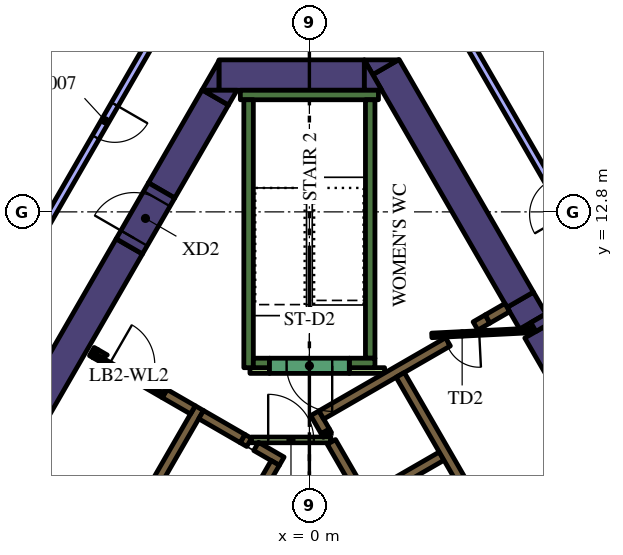
"""IFC4 building model, lengths in metres.
Left out: names, types, materials, properties, quantities, classifications, styles, units other than length and angle.
Written with IfcOpenShell. Run it as: python <this file> out.ifc"""

import sys

from ifc_helpers import new_model, si_unit, direction, frame, frame_2d, origin, place, context, subcontext, project, spatial, polyline, rectangle, outline, extrude, element, fill, save


model = new_model("IFC4")
c1 = context("Model", 3, precision=1e-05, world=origin(), true_north=direction((0.0, 1.0)))
c2 = subcontext(c1, "Body", "Model", "MODEL_VIEW")
j1 = project(units=[si_unit("LENGTHUNIT", "METRE"), si_unit("PLANEANGLEUNIT", "RADIAN")], contexts=[c1])
p1 = place(None, origin())
s1 = spatial("IfcSite", under=j1, at=p1, CompositionType="ELEMENT")
p2 = place(p1, origin())
s2 = spatial("IfcBuilding", under=s1, at=p2, CompositionType="ELEMENT")
p3 = place(p2, frame((0.0, 0.0, 183.6)))
s3 = spatial("IfcBuildingStorey", under=s2, at=p3, CompositionType="ELEMENT", Elevation=183.6)
p4 = place(p3, frame((5.878, 9.918, 0.0), z_axis=(0.0, 0.0, 1.0), x_axis=(-0.499893918903, 0.866086641072, 0.0)))
e1 = element("IfcWall", 1, at=p4, inside=s3, PredefinedType="SOLIDWALL", context=c2, shape_type="SweptSolid", body=[
    extrude(rectangle(XDim=0.657, YDim=0.8, at=frame_2d((0.329, 0.0))), origin(), (0.0, 0.0, 1.0), 4.2),
])
p5 = place(p3, frame((8.279, 5.761, 0.0), z_axis=(0.0, 0.0, 1.0), x_axis=(-0.500024261398, 0.866011396007, 0.0)))
e2 = element("IfcWall", 2, at=p5, inside=s3, PredefinedType="SOLIDWALL", context=c2, shape_type="SweptSolid", body=[
    extrude(rectangle(XDim=4.528, YDim=0.8, at=frame_2d((2.264, 0.0))), origin(), (0.0, 0.0, 1.0), 4.2),
])
p6 = place(p3, origin())
e3 = element("IfcWall", 3, at=p6, inside=s3, PredefinedType="SOLIDWALL", context=c2, shape_type="SweptSolid", body=[
    extrude(outline(polyline([(5.961, 9.654), (5.827, 9.886), (6.226, 10.116), (6.36, 9.884), (5.961, 9.654)])), origin(), (0.0, 0.0, 1.0), 4.2),
])
p7 = place(p3, frame((5.549, 10.489, 0.0), z_axis=(0.0, 0.0, 1.0), x_axis=(-0.50001746176, 0.866015321998, 0.0)))
e4 = element("IfcWall", 4, at=p7, inside=s3, PredefinedType="SOLIDWALL", context=c2, shape_type="SweptSolid", body=[
    extrude(rectangle(XDim=7.068, YDim=0.8, at=frame_2d((3.534, 0.0))), origin(), (0.0, 0.0, 1.0), 4.2),
])
e5 = element("IfcWall", 5, at=p6, inside=s3, PredefinedType="SOLIDWALL", context=c2, shape_type="SweptSolid", body=[
    extrude(outline(polyline([(1.443, 16.8), (2.339, 16.8), (1.667, 16.412), (1.443, 16.8)])), origin(), (0.0, 0.0, 1.0), 4.2),
])
p8 = place(p3, frame((-2.379, 16.4, 0.0), z_axis=(0.0, 0.0, 1.0), x_axis=(1.0, 0.0, 0.0)))
e6 = element("IfcWall", 6, at=p8, inside=s3, PredefinedType="SOLIDWALL", context=c2, shape_type="SweptSolid", body=[
    extrude(rectangle(XDim=3.824, YDim=0.8, at=frame_2d((1.912, 0.0))), origin(), (0.0, 0.0, 1.0), 4.2),
])
e7 = element("IfcWall", 7, at=p6, inside=s3, PredefinedType="SOLIDWALL", context=c2, shape_type="SweptSolid", body=[
    extrude(outline(polyline([(1.905, 16.0), (1.447, 16.0), (1.447, 16.793), (1.905, 16.0)])), origin(), (0.0, 0.0, 1.0), 4.2),
])
e8 = element("IfcWall", 8, at=p6, inside=s3, PredefinedType="SOLIDWALL", context=c2, shape_type="SweptSolid", body=[
    extrude(outline(polyline([(-2.829, 16.0), (-2.381, 16.776), (-2.381, 16.0), (-2.829, 16.0)])), origin(), (0.0, 0.0, 1.0), 4.2),
])
p9 = place(p3, frame((-2.477, 15.81, 0.0), z_axis=(0.0, 0.0, 1.0), x_axis=(-0.499969377405, -0.866043083026, 0.0)))
e9 = element("IfcWall", 9, at=p9, inside=s3, PredefinedType="SOLIDWALL", context=c2, shape_type="SweptSolid", body=[
    extrude(rectangle(XDim=2.824, YDim=0.8, at=frame_2d((1.412, 0.0))), origin(), (0.0, 0.0, 1.0), 4.2),
])
e10 = element("IfcWall", 10, at=p6, inside=s3, PredefinedType="SOLIDWALL", context=c2, shape_type="SweptSolid", body=[
    extrude(outline(polyline([(-1.905, 16.0), (-2.129, 15.612), (-2.801, 16.0), (-1.905, 16.0)])), origin(), (0.0, 0.0, 1.0), 4.2),
])
p10 = place(p3, frame((-12.668, -1.842, 0.0), z_axis=(0.0, 0.0, 1.0), x_axis=(0.500003640647, 0.866023301845, 0.0)))
e11 = element("IfcWall", 11, at=p10, inside=s3, PredefinedType="SOLIDWALL", context=c2, shape_type="SweptSolid", body=[
    extrude(rectangle(XDim=15.858, YDim=0.8, at=frame_2d((7.929, 0.0))), origin(), (0.0, 0.0, 1.0), 4.2),
])
p11 = place(p3, frame((-1.817, 15.875, 0.0), z_axis=(0.0, 0.0, 1.0), x_axis=(1.0, 0.0, 0.0)))
e12 = element("IfcWall", 12, at=p11, inside=s3, PredefinedType="SOLIDWALL", context=c2, shape_type="SweptSolid", body=[
    extrude(rectangle(XDim=3.634, YDim=0.25, at=frame_2d((1.817, 0.0))), origin(), (0.0, 0.0, 1.0), 4.2),
])
p12 = place(p3, frame((1.6, 8.95, 0.0), z_axis=(0.0, 0.0, 1.0), x_axis=(0.0, 1.0, 0.0)))
e13 = element("IfcWall", 13, at=p12, inside=s3, PredefinedType="SOLIDWALL", context=c2, shape_type="SweptSolid", body=[
    extrude(rectangle(XDim=6.8, YDim=0.25, at=frame_2d((3.4, 0.0))), origin(), (0.0, 0.0, 1.0), 4.2),
])
p13 = place(p3, frame((1.05, 8.825, 0.0), z_axis=(0.0, 0.0, 1.0), x_axis=(1.0, 0.0, 0.0)))
e14 = element("IfcWall", 14, at=p13, inside=s3, PredefinedType="SOLIDWALL", context=c2, shape_type="SweptSolid", body=[
    extrude(rectangle(XDim=0.675, YDim=0.25, at=frame_2d((0.337, 0.0))), origin(), (0.0, 0.0, 1.0), 4.2),
])
p14 = place(p3, frame((-1.6, 8.7, 0.0), z_axis=(0.0, 0.0, 1.0), x_axis=(0.0, 1.0, 0.0)))
e15 = element("IfcWall", 15, at=p14, inside=s3, PredefinedType="SOLIDWALL", context=c2, shape_type="SweptSolid", body=[
    extrude(rectangle(XDim=7.05, YDim=0.25, at=frame_2d((3.525, 0.0))), origin(), (0.0, 0.0, 1.0), 4.2),
])
p15 = place(p3, frame((-1.475, 8.825, 0.0), z_axis=(0.0, 0.0, 1.0), x_axis=(1.0, 0.0, 0.0)))
e16 = element("IfcWall", 16, at=p15, inside=s3, PredefinedType="SOLIDWALL", context=c2, shape_type="SweptSolid", body=[
    extrude(rectangle(XDim=0.425, YDim=0.25, at=frame_2d((0.212, 0.0))), origin(), (0.0, 0.0, 1.0), 4.2),
])
p16 = place(p3, frame((0.473, 6.93, 0.0), z_axis=(0.0, 0.0, 1.0), x_axis=(-0.49972245349, 0.866185586049, 0.0)))
e17 = element("IfcWall", 17, at=p16, inside=s3, PredefinedType="SOLIDWALL", context=c2, shape_type="SweptSolid", body=[
    extrude(rectangle(XDim=0.11, YDim=0.25, at=frame_2d((0.055, 0.0))), origin(), (0.0, 0.0, 1.0), 4.2),
])
p17 = place(p3, frame((6.568, -3.627, 0.0), z_axis=(0.0, 0.0, 1.0), x_axis=(-0.499999455981, 0.866025717874, 0.0)))
e18 = element("IfcWall", 18, at=p17, inside=s3, PredefinedType="SOLIDWALL", context=c2, shape_type="SweptSolid", body=[
    extrude(rectangle(XDim=11.978, YDim=0.25, at=frame_2d((5.989, 0.0))), origin(), (0.0, 0.0, 1.0), 4.2),
])
p18 = place(p3, frame((0.417, 7.027, 0.0), z_axis=(0.0, 0.0, 1.0), x_axis=(-0.500210807569, 0.865903659763, 0.0)))
e19 = element("IfcWall", 19, at=p18, inside=s3, PredefinedType="SOLIDWALL", context=c2, shape_type="SweptSolid", body=[
    extrude(rectangle(XDim=0.548, YDim=0.25, at=frame_2d((0.274, 0.0))), origin(), (0.0, 0.0, 1.0), 4.2),
])
p19 = place(p3, frame((3.647, 9.38, 0.0), z_axis=(0.0, 0.0, 1.0), x_axis=(-0.866025015791, -0.500000672024, 0.0)))
e20 = element("IfcWall", 20, at=p19, inside=s3, PredefinedType="SOLIDWALL", context=c2, shape_type="SweptSolid", body=[
    extrude(rectangle(XDim=3.849, YDim=0.25, at=frame_2d((1.924, 0.0))), origin(), (0.0, 0.0, 1.0), 4.2),
])
p20 = place(p3, frame((1.574, 5.274, 0.0), z_axis=(0.0, 0.0, 1.0), x_axis=(0.866028486751, 0.499994660107, 0.0)))
e21 = element("IfcWall", 21, at=p20, inside=s3, PredefinedType="SOLIDWALL", context=c2, shape_type="SweptSolid", body=[
    extrude(rectangle(XDim=2.2, YDim=0.25, at=frame_2d((1.1, 0.0))), origin(), (0.0, 0.0, 1.0), 4.2),
])
p21 = place(p3, frame((4.688, 9.981, 0.0), z_axis=(0.0, 0.0, 1.0), x_axis=(-0.865974312977, -0.500088481434, 0.0)))
e22 = element("IfcWall", 22, at=p21, inside=s3, PredefinedType="SOLIDWALL", context=c2, shape_type="SweptSolid", body=[
    extrude(rectangle(XDim=0.366, YDim=0.25, at=frame_2d((0.183, 0.0))), origin(), (0.0, 0.0, 1.0), 4.2),
])
p22 = place(p3, frame((4.689, 9.982, 0.0), z_axis=(0.0, 0.0, 1.0), x_axis=(0.865947592822, 0.500134748329, 0.0)))
e23 = element("IfcWall", 23, at=p22, inside=s3, PredefinedType="SOLIDWALL", context=c2, shape_type="SweptSolid", body=[
    extrude(rectangle(XDim=0.598, YDim=0.25, at=frame_2d((0.299, 0.0))), origin(), (0.0, 0.0, 1.0), 4.2),
])
p23 = place(p3, frame((-8.06, -1.311, 0.0), z_axis=(0.0, 0.0, 1.0), x_axis=(0.50000273126, 0.866023826885, 0.0)))
e24 = element("IfcWall", 24, at=p23, inside=s3, PredefinedType="SOLIDWALL", context=c2, shape_type="SweptSolid", body=[
    extrude(rectangle(XDim=10.33, YDim=0.25, at=frame_2d((5.165, 0.0))), origin(), (0.0, 0.0, 1.0), 4.2),
])
p24 = place(p3, frame((-1.758, 6.835, 0.0), z_axis=(0.0, 0.0, 1.0), x_axis=(0.865982457891, -0.500074377092, 0.0)))
e25 = element("IfcWall", 25, at=p24, inside=s3, PredefinedType="SOLIDWALL", context=c2, shape_type="SweptSolid", body=[
    extrude(rectangle(XDim=0.2, YDim=0.25, at=frame_2d((0.1, 0.0))), origin(), (0.0, 0.0, 1.0), 4.2),
])
p25 = place(p3, frame((-1.76, 6.836, 0.0), z_axis=(0.0, 0.0, 1.0), x_axis=(-0.865952863304, 0.500125622755, 0.0)))
e26 = element("IfcWall", 26, at=p25, inside=s3, PredefinedType="SOLIDWALL", context=c2, shape_type="SweptSolid", body=[
    extrude(rectangle(XDim=1.258, YDim=0.25, at=frame_2d((0.629, 0.0))), origin(), (0.0, 0.0, 1.0), 4.2),
])
p26 = place(p3, frame((-0.728, 6.24, 0.0), z_axis=(0.0, 0.0, 1.0), x_axis=(-0.865955664968, 0.500120771724, 0.0)))
e27 = element("IfcWall", 27, at=p26, inside=s3, PredefinedType="SOLIDWALL", context=c2, shape_type="SweptSolid", body=[
    extrude(rectangle(XDim=0.778, YDim=0.25, at=frame_2d((0.389, 0.0))), origin(), (0.0, 0.0, 1.0), 4.2),
])
p27 = place(p3, frame((-5.725, 9.125, 0.0), z_axis=(0.0, 0.0, 1.0), x_axis=(0.866185586049, -0.49972245349, 0.0)))
e28 = element("IfcWall", 28, at=p27, inside=s3, PredefinedType="SOLIDWALL", context=c2, shape_type="SweptSolid", body=[
    extrude(rectangle(XDim=0.11, YDim=0.25, at=frame_2d((0.055, 0.0))), origin(), (0.0, 0.0, 1.0), 4.2),
])
p28 = place(p3, frame((-3.066, 7.59, 0.0), z_axis=(0.0, 0.0, 1.0), x_axis=(-0.866081358704, 0.49990307071, 0.0)))
e29 = element("IfcWall", 29, at=p28, inside=s3, PredefinedType="SOLIDWALL", context=c2, shape_type="SweptSolid", body=[
    extrude(rectangle(XDim=0.858, YDim=0.25, at=frame_2d((0.429, 0.0))), origin(), (0.0, 0.0, 1.0), 4.2),
])
e30 = element("IfcWall", 30, at=p6, inside=s3, PredefinedType="SOLIDWALL", context=c2, shape_type="SweptSolid", body=[
    extrude(outline(polyline([(-3.748, 8.128), (-3.813, 8.015), (-4.027, 8.139), (-4.017, 8.156), (-4.008, 8.173), (-4.0, 8.192), (-3.995, 8.21), (-3.991, 8.23), (-3.99, 8.25), (-3.99, 8.268), (-3.748, 8.128)])), origin(), (0.0, 0.0, 1.0), 4.2),
])
e31 = element("IfcWall", 31, at=p6, inside=s3, PredefinedType="SOLIDWALL", context=c2, shape_type="SweptSolid", body=[
    extrude(outline(polyline([(-5.689, 8.96), (-5.69, 8.961), (-5.565, 9.177), (-5.319, 9.035), (-5.335, 9.026), (-5.351, 9.015), (-5.366, 9.002), (-5.379, 8.988), (-5.392, 8.972), (-5.402, 8.956), (-5.412, 8.939), (-5.629, 9.064), (-5.629, 9.064), (-5.689, 8.96)])), origin(), (0.0, 0.0, 1.0), 4.2),
])
p29 = place(p3, frame((1.05, 8.625, 0.0), z_axis=(0.0, 0.0, 1.0), x_axis=(1.0, 0.0, 0.0)))
e32 = element("IfcWall", 32, at=p29, inside=s3, PredefinedType="PARTITIONING", context=c2, shape_type="SweptSolid", body=[
    extrude(rectangle(XDim=0.929, YDim=0.15, at=frame_2d((0.464, 0.0))), origin(), (0.0, 0.0, 1.0), 3.15),
])
p30 = place(p3, frame((-1.564, 8.625, 0.0), z_axis=(0.0, 0.0, 1.0), x_axis=(1.0, 0.0, 0.0)))
e33 = element("IfcWall", 33, at=p30, inside=s3, PredefinedType="PARTITIONING", context=c2, shape_type="SweptSolid", body=[
    extrude(rectangle(XDim=0.514, YDim=0.15, at=frame_2d((0.257, 0.0))), origin(), (0.0, 0.0, 1.0), 3.15),
])
p31 = place(p3, frame((8.565, -2.185, 0.0), z_axis=(0.0, 0.0, 1.0), x_axis=(-0.499997954832, 0.866026584559, 0.0)))
e34 = element("IfcWall", 34, at=p31, inside=s3, PredefinedType="SOLIDWALL", context=c2, shape_type="SweptSolid", body=[
    extrude(rectangle(XDim=12.35, YDim=0.25, at=frame_2d((6.175, 0.0))), origin(), (0.0, 0.0, 1.0), 4.2),
])
p32 = place(p31, frame((0.585, 0.0, 0.0)))
e35 = element("IfcOpeningElement", 35, at=p32, cuts=e34, PredefinedType="OPENING", context=c2, shape_type="SweptSolid", body=[
    extrude(rectangle(XDim=1.1, YDim=2.1, at=frame_2d((0.55, 1.05))), frame((0.0, 0.135, 0.0), z_axis=(0.0, -1.0, 0.0), x_axis=(1.0, 0.0, 0.0)), (0.0, 0.0, 1.0), 0.27),
])
p33 = place(p3, frame((-0.898, 6.194, 0.0), z_axis=(0.0, 0.0, 1.0), x_axis=(-0.499996202215, -0.866027596426, 0.0)))
e36 = element("IfcWall", 36, at=p33, inside=s3, PredefinedType="SOLIDWALL", context=c2, shape_type="SweptSolid", body=[
    extrude(rectangle(XDim=9.83, YDim=0.25, at=frame_2d((4.915, 0.0))), origin(), (0.0, 0.0, 1.0), 4.2),
])
p34 = place(p33, frame((0.585, 0.0, 0.0)))
e37 = element("IfcOpeningElement", 37, at=p34, cuts=e36, PredefinedType="OPENING", context=c2, shape_type="SweptSolid", body=[
    extrude(rectangle(XDim=1.1, YDim=2.1, at=frame_2d((0.55, 1.05))), frame((0.0, 0.135, 0.0), z_axis=(0.0, -1.0, 0.0), x_axis=(1.0, 0.0, 0.0)), (0.0, 0.0, 1.0), 0.27),
])
p35 = place(p33, frame((3.105, 0.0, 0.0)))
e38 = element("IfcOpeningElement", 38, at=p35, cuts=e36, PredefinedType="OPENING", context=c2, shape_type="SweptSolid", body=[
    extrude(rectangle(XDim=1.1, YDim=2.1, at=frame_2d((0.55, 1.05))), frame((0.0, 0.135, 0.0), z_axis=(0.0, -1.0, 0.0), x_axis=(1.0, 0.0, 0.0)), (0.0, 0.0, 1.0), 0.27),
])
p36 = place(p33, frame((5.625, 0.0, 0.0)))
e39 = element("IfcOpeningElement", 39, at=p36, cuts=e36, PredefinedType="OPENING", context=c2, shape_type="SweptSolid", body=[
    extrude(rectangle(XDim=1.1, YDim=2.1, at=frame_2d((0.55, 1.05))), frame((0.0, 0.135, 0.0), z_axis=(0.0, -1.0, 0.0), x_axis=(1.0, 0.0, 0.0)), (0.0, 0.0, 1.0), 0.27),
])
p37 = place(p33, frame((8.145, 0.0, 0.0)))
e40 = element("IfcOpeningElement", 40, at=p37, cuts=e36, PredefinedType="OPENING", context=c2, shape_type="SweptSolid", body=[
    extrude(rectangle(XDim=1.1, YDim=2.1, at=frame_2d((0.55, 1.05))), frame((0.0, 0.135, 0.0), z_axis=(0.0, -1.0, 0.0), x_axis=(1.0, 0.0, 0.0)), (0.0, 0.0, 1.0), 0.27),
])
p38 = place(p3, frame((1.05, 8.75, 0.0), z_axis=(0.0, 0.0, 1.0), x_axis=(-1.0, 0.0, 0.0)))
e41 = element("IfcWall", 41, at=p38, inside=s3, PredefinedType="SOLIDWALL", context=c2, shape_type="SweptSolid", body=[
    extrude(rectangle(XDim=2.1, YDim=0.4, at=frame_2d((1.05, 0.0))), origin(), (0.0, 0.0, 1.0), 4.2),
])
p39 = place(p38, frame((0.45, 0.0, 0.0)))
e42 = element("IfcOpeningElement", 42, at=p39, cuts=e41, PredefinedType="OPENING", context=c2, shape_type="SweptSolid", body=[
    extrude(rectangle(XDim=1.2, YDim=2.1, at=frame_2d((0.6, 1.05))), frame((0.0, 0.21, 0.0), z_axis=(0.0, -1.0, 0.0), x_axis=(1.0, 0.0, 0.0)), (0.0, 0.0, 1.0), 0.42),
])
p40 = place(p3, frame((5.917, 9.684, 0.0), z_axis=(0.0, 0.0, 1.0), x_axis=(-0.998758194515, -0.049820366212, 0.0)))
e43 = element("IfcWall", 43, at=p40, inside=s3, PredefinedType="PARTITIONING", context=c2, shape_type="SweptSolid", body=[
    extrude(rectangle(XDim=2.7, YDim=0.12, at=frame_2d((1.35, 0.0))), origin(), (0.0, 0.0, 1.0), 3.15),
])
p41 = place(p40, frame((1.45, 0.0, 0.0)))
e44 = element("IfcOpeningElement", 44, at=p41, cuts=e43, PredefinedType="OPENING", context=c2, shape_type="SweptSolid", body=[
    extrude(rectangle(XDim=0.9, YDim=2.1, at=frame_2d((0.45, 1.05))), frame((0.0, 0.07, 0.0), z_axis=(0.0, -1.0, 0.0), x_axis=(1.0, 0.0, 0.0)), (0.0, 0.0, 1.0), 0.14),
])
p42 = place(p3, frame((-1.534, 6.8, 0.0), z_axis=(0.0, 0.0, 1.0), x_axis=(1.0, 0.0, 0.0)))
e45 = element("IfcWall", 45, at=p42, inside=s3, PredefinedType="PARTITIONING", context=c2, shape_type="SweptSolid", body=[
    extrude(rectangle(XDim=2.1, YDim=0.15, at=frame_2d((1.05, 0.0))), origin(), (0.0, 0.0, 1.0), 3.15),
])
p43 = place(p42, frame((0.45, 0.0, 0.0)))
e46 = element("IfcOpeningElement", 46, at=p43, cuts=e45, PredefinedType="OPENING", context=c2, shape_type="SweptSolid", body=[
    extrude(rectangle(XDim=1.2, YDim=2.1, at=frame_2d((0.6, 1.05))), frame((0.0, 0.085, 0.0), z_axis=(0.0, -1.0, 0.0), x_axis=(1.0, 0.0, 0.0)), (0.0, 0.0, 1.0), 0.17),
])
p44 = place(p3, frame((-5.659, 9.012, 0.0), z_axis=(0.0, 0.0, 1.0), x_axis=(0.866009402589, -0.500027713859, 0.0)))
e47 = element("IfcWall", 47, at=p44, inside=s3, PredefinedType="PARTITIONING", context=c2, shape_type="SweptSolid", body=[
    extrude(rectangle(XDim=2.1, YDim=0.12, at=frame_2d((1.05, 0.0))), origin(), (0.0, 0.0, 1.0), 3.15),
])
p45 = place(p44, frame((0.45, 0.0, 0.0)))
e48 = element("IfcOpeningElement", 48, at=p45, cuts=e47, PredefinedType="OPENING", context=c2, shape_type="SweptSolid", body=[
    extrude(rectangle(XDim=1.2, YDim=2.1, at=frame_2d((0.6, 1.05))), frame((0.0, 0.07, 0.0), z_axis=(0.0, -1.0, 0.0), x_axis=(1.0, 0.0, 0.0)), (0.0, 0.0, 1.0), 0.14),
])
p46 = place(p3, frame((-4.739, 11.892, 0.0), z_axis=(0.0, 0.0, 1.0), x_axis=(0.500062241894, 0.865989465428, 0.0)))
e49 = element("IfcWall", 49, at=p46, inside=s3, PredefinedType="SOLIDWALL", context=c2, shape_type="SweptSolid", body=[
    extrude(rectangle(XDim=1.7, YDim=0.8, at=frame_2d((0.85, 0.0))), origin(), (0.0, 0.0, 1.0), 4.2),
])
p47 = place(p46, frame((0.25, 0.0, 0.0)))
e50 = element("IfcOpeningElement", 50, at=p47, cuts=e49, PredefinedType="OPENING", context=c2, shape_type="SweptSolid", body=[
    extrude(rectangle(XDim=1.2, YDim=2.1, at=frame_2d((0.6, 1.05))), frame((0.0, 0.41, 0.0), z_axis=(0.0, -1.0, 0.0), x_axis=(1.0, 0.0, 0.0)), (0.0, 0.0, 1.0), 0.82),
])
p48 = place(p3, frame((8.844, 9.182, 0.0), z_axis=(0.0, 0.0, 1.0), x_axis=(-0.50000000053, 0.866025403479, 0.0)))
e51 = element("IfcWall", 51, at=p48, inside=s3, PredefinedType="PARTITIONING", context=c2, shape_type="SweptSolid", body=[
    extrude(rectangle(XDim=9.188, YDim=0.2, at=frame_2d((4.594, 0.0))), origin(), (0.0, 0.0, 1.0), 3.15),
])
p49 = place(p48, frame((4.1, 0.0, 0.0)))
e52 = element("IfcOpeningElement", 52, at=p49, cuts=e51, PredefinedType="OPENING", context=c2, shape_type="SweptSolid", body=[
    extrude(rectangle(XDim=1.0, YDim=2.1, at=frame_2d((0.5, 1.05))), frame((0.0, 0.11, 0.0), z_axis=(0.0, -1.0, 0.0), x_axis=(1.0, 0.0, 0.0)), (0.0, 0.0, 1.0), 0.22),
])
p50 = place(p3, frame((-3.421, 18.574, 0.0), z_axis=(0.0, 0.0, 1.0), x_axis=(-0.499989434416, -0.866031503741, 0.0)))
e53 = element("IfcWall", 53, at=p50, inside=s3, PredefinedType="PARTITIONING", context=c2, shape_type="SweptSolid", body=[
    extrude(rectangle(XDim=7.863, YDim=0.2, at=frame_2d((3.932, 0.0))), origin(), (0.0, 0.0, 1.0), 3.15),
])
p51 = place(p50, frame((3.4, 0.0, 0.0)))
e54 = element("IfcOpeningElement", 54, at=p51, cuts=e53, PredefinedType="OPENING", context=c2, shape_type="SweptSolid", body=[
    extrude(rectangle(XDim=1.0, YDim=2.1, at=frame_2d((0.5, 1.05))), frame((0.0, 0.11, 0.0), z_axis=(0.0, -1.0, 0.0), x_axis=(1.0, 0.0, 0.0)), (0.0, 0.0, 1.0), 0.22),
])
p52 = place(p39, origin())
e55 = element("IfcDoor", 55, at=p52, inside=s3, OperationType="SINGLE_SWING_LEFT", PredefinedType="DOOR", context=c2, shape_type="SweptSolid", body=[
    extrude(rectangle(XDim=1.2, YDim=2.1, at=frame_2d((0.6, 1.05))), frame((0.0, 0.025, 0.0), z_axis=(0.0, -1.0, 0.0), x_axis=(1.0, 0.0, 0.0)), (0.0, 0.0, 1.0), 0.05),
])
fill(e42, e55)
p53 = place(p41, origin())
e56 = element("IfcDoor", 56, at=p53, inside=s3, OperationType="SINGLE_SWING_LEFT", PredefinedType="DOOR", context=c2, shape_type="SweptSolid", body=[
    extrude(rectangle(XDim=0.9, YDim=2.1, at=frame_2d((0.45, 1.05))), frame((0.0, 0.025, 0.0), z_axis=(0.0, -1.0, 0.0), x_axis=(1.0, 0.0, 0.0)), (0.0, 0.0, 1.0), 0.05),
])
fill(e44, e56)
p54 = place(p43, origin())
e57 = element("IfcDoor", 57, at=p54, inside=s3, OperationType="SINGLE_SWING_LEFT", PredefinedType="DOOR", context=c2, shape_type="SweptSolid", body=[
    extrude(rectangle(XDim=1.2, YDim=2.1, at=frame_2d((0.6, 1.05))), frame((0.0, 0.025, 0.0), z_axis=(0.0, -1.0, 0.0), x_axis=(1.0, 0.0, 0.0)), (0.0, 0.0, 1.0), 0.05),
])
fill(e46, e57)
p55 = place(p45, origin())
e58 = element("IfcDoor", 58, at=p55, inside=s3, OperationType="SINGLE_SWING_LEFT", PredefinedType="DOOR", context=c2, shape_type="SweptSolid", body=[
    extrude(rectangle(XDim=1.2, YDim=2.1, at=frame_2d((0.6, 1.05))), frame((0.0, 0.025, 0.0), z_axis=(0.0, -1.0, 0.0), x_axis=(1.0, 0.0, 0.0)), (0.0, 0.0, 1.0), 0.05),
])
fill(e48, e58)
p56 = place(p47, origin())
e59 = element("IfcDoor", 59, at=p56, inside=s3, OperationType="SINGLE_SWING_LEFT", PredefinedType="DOOR", context=c2, shape_type="SweptSolid", body=[
    extrude(rectangle(XDim=1.2, YDim=2.1, at=frame_2d((0.6, 1.05))), frame((0.0, 0.025, 0.0), z_axis=(0.0, -1.0, 0.0), x_axis=(1.0, 0.0, 0.0)), (0.0, 0.0, 1.0), 0.05),
])
fill(e50, e59)
p57 = place(p51, origin())
e60 = element("IfcDoor", 60, at=p57, inside=s3, OperationType="SINGLE_SWING_LEFT", PredefinedType="DOOR", context=c2, shape_type="SweptSolid", body=[
    extrude(rectangle(XDim=1.0, YDim=2.1, at=frame_2d((0.5, 1.05))), frame((0.0, 0.025, 0.0), z_axis=(0.0, -1.0, 0.0), x_axis=(1.0, 0.0, 0.0)), (0.0, 0.0, 1.0), 0.05),
])
fill(e54, e60)
save(model, sys.argv[1])
